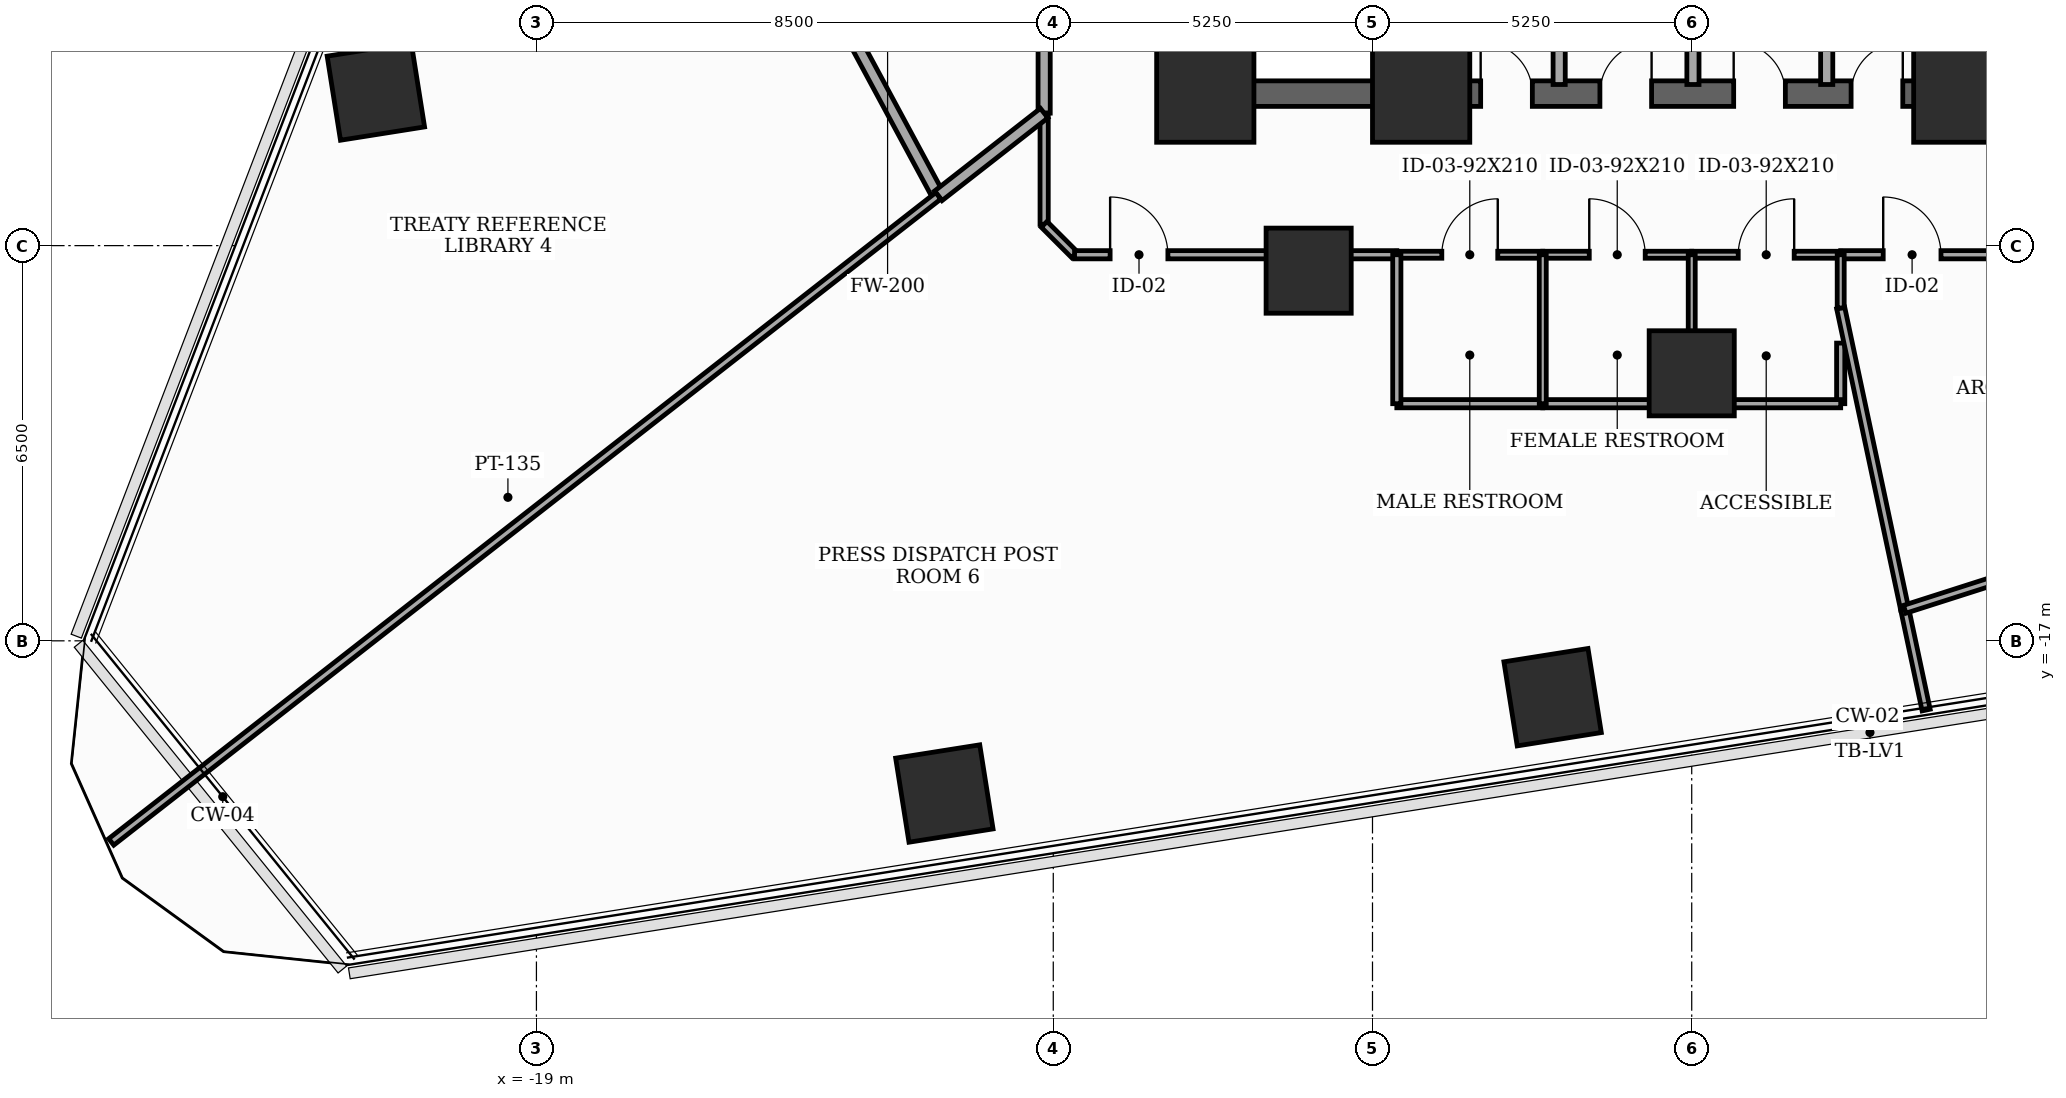
"""IFC4 building model, lengths in metres.
Left out: names, types, materials, properties, quantities, classifications, styles, units other than length and angle.
Written with IfcOpenShell. Run it as: python <this file> out.ifc"""

import sys

from ifc_helpers import new_model, si_unit, direction, frame, frame_2d, origin, origin_2d, place, context, subcontext, project, spatial, rectangle, extrude, element, fill, save


model = new_model("IFC4")
c1 = context("Model", 3, precision=1e-05, world=origin(), true_north=direction((0.0, 1.0)))
c2 = subcontext(c1, "Body", "Model", "MODEL_VIEW")
j1 = project(units=[si_unit("LENGTHUNIT", "METRE"), si_unit("PLANEANGLEUNIT", "RADIAN")], contexts=[c1])
p1 = place(None, origin())
s1 = spatial("IfcSite", under=j1, at=p1, CompositionType="ELEMENT")
p2 = place(p1, origin())
s2 = spatial("IfcBuilding", under=s1, at=p2, CompositionType="ELEMENT")
p3 = place(p2, frame((0.0, 0.0, 81.5)))
s3 = spatial("IfcBuildingStorey", under=s2, at=p3, CompositionType="ELEMENT", Elevation=81.5)
for number, where, z_axis, x_axis in (
    (1, (-8.0, -8.0, 0.0), (0.0, 0.0, 1.0), (1.0, 0.0, 0.0)),
    (2, (-4.45, -8.0, 0.0), (0.0, 0.0, 1.0), (1.0, 0.0, 0.0)),
    (3, (4.45, -8.0, 0.0), (0.0, 0.0, 1.0), (1.0, 0.0, 0.0)),
):
    element("IfcColumn", number, at=place(p3, frame(where, z_axis=z_axis, x_axis=x_axis)), inside=s3, PredefinedType="COLUMN", context=c2, shape_type="SweptSolid", body=[
        extrude(rectangle(XDim=1.6, YDim=1.6, at=origin_2d()), origin(), (0.0, 0.0, 1.0), 3.7),
    ])
for number, where, z_axis, x_axis in (
    (4, (-6.3, -10.912, 0.0), (0.0, 0.0, 1.0), (1.0, 0.0, 0.0)),
    (5, (0.0, -12.6, 0.0), (0.0, 0.0, 1.0), (1.0, 0.0, 0.0)),
    (6, (-12.291, -19.511, 0.0), (0.0, 0.0, 1.0), (0.988, 0.156, 0.0)),
    (7, (-2.288, -17.927, 0.0), (0.0, 0.0, 1.0), (0.988, 0.156, 0.0)),
    (8, (-21.641, -7.966, 0.0), (0.0, 0.0, 1.0), (0.988, 0.156, 0.0)),
):
    element("IfcColumn", number, at=place(p3, frame(where, z_axis=z_axis, x_axis=x_axis)), inside=s3, PredefinedType="COLUMN", context=c2, shape_type="SweptSolid", body=[
        extrude(rectangle(XDim=1.4, YDim=1.4, at=origin_2d()), origin(), (0.0, 0.0, 1.0), 3.7),
    ])
p4 = place(p3, frame((-8.0, -8.0, 0.0), z_axis=(0.0, 0.0, 1.0), x_axis=(0.0, 1.0, 0.0)))
e9 = element("IfcWall", 9, at=p4, inside=s3, PredefinedType="SHEAR", context=c2, shape_type="SweptSolid", body=[
    extrude(rectangle(XDim=16.0, YDim=0.42, at=frame_2d((8.0, 0.0))), origin(), (0.0, 0.0, 1.0), 3.46),
])
p5 = place(p4, frame((1.002, 0.0, 0.0)))
e10 = element("IfcOpeningElement", 10, at=p5, cuts=e9, PredefinedType="OPENING", context=c2, shape_type="SweptSolid", body=[
    extrude(rectangle(XDim=0.85, YDim=2.02, at=frame_2d((0.425, 1.01))), frame((0.0, 0.22, 0.0), z_axis=(0.0, -1.0, 0.0), x_axis=(1.0, 0.0, 0.0)), (0.0, 0.0, 1.0), 0.44),
])
p6 = place(p4, frame((5.35, 0.0, 0.0)))
e11 = element("IfcOpeningElement", 11, at=p6, cuts=e9, PredefinedType="OPENING", context=c2, shape_type="SweptSolid", body=[
    extrude(rectangle(XDim=1.05, YDim=2.15, at=frame_2d((0.525, 1.075))), frame((0.0, 0.22, 0.0), z_axis=(0.0, -1.0, 0.0), x_axis=(1.0, 0.0, 0.0)), (0.0, 0.0, 1.0), 0.44),
])
p7 = place(p3, frame((-8.0, -8.0, 0.0), z_axis=(0.0, 0.0, 1.0), x_axis=(1.0, 0.0, 0.0)))
e12 = element("IfcWall", 12, at=p7, inside=s3, PredefinedType="SHEAR", context=c2, shape_type="SweptSolid", body=[
    extrude(rectangle(XDim=16.0, YDim=0.42, at=frame_2d((8.0, 0.0))), origin(), (0.0, 0.0, 1.0), 3.46),
])
p8 = place(p7, frame((4.529, 0.0, 0.0)))
e13 = element("IfcOpeningElement", 13, at=p8, cuts=e12, PredefinedType="OPENING", context=c2, shape_type="SweptSolid", body=[
    extrude(rectangle(XDim=0.85, YDim=2.02, at=frame_2d((0.425, 1.01))), frame((0.0, 0.22, 0.0), z_axis=(0.0, -1.0, 0.0), x_axis=(1.0, 0.0, 0.0)), (0.0, 0.0, 1.0), 0.44),
])
p9 = place(p7, frame((6.49, 0.0, 0.0)))
e14 = element("IfcOpeningElement", 14, at=p9, cuts=e12, PredefinedType="OPENING", context=c2, shape_type="SweptSolid", body=[
    extrude(rectangle(XDim=0.85, YDim=2.02, at=frame_2d((0.425, 1.01))), frame((0.0, 0.22, 0.0), z_axis=(0.0, -1.0, 0.0), x_axis=(1.0, 0.0, 0.0)), (0.0, 0.0, 1.0), 0.44),
])
p10 = place(p7, frame((8.69, 0.0, 0.0)))
e15 = element("IfcOpeningElement", 15, at=p10, cuts=e12, PredefinedType="OPENING", context=c2, shape_type="SweptSolid", body=[
    extrude(rectangle(XDim=0.85, YDim=2.02, at=frame_2d((0.425, 1.01))), frame((0.0, 0.22, 0.0), z_axis=(0.0, -1.0, 0.0), x_axis=(1.0, 0.0, 0.0)), (0.0, 0.0, 1.0), 0.44),
])
p11 = place(p7, frame((10.621, 0.0, 0.0)))
e16 = element("IfcOpeningElement", 16, at=p11, cuts=e12, PredefinedType="OPENING", context=c2, shape_type="SweptSolid", body=[
    extrude(rectangle(XDim=0.85, YDim=2.02, at=frame_2d((0.425, 1.01))), frame((0.0, 0.22, 0.0), z_axis=(0.0, -1.0, 0.0), x_axis=(1.0, 0.0, 0.0)), (0.0, 0.0, 1.0), 0.44),
])
for number, where, z_axis, x_axis in (
    (17, (-4.45, -7.79, 0.0), (0.0, 0.0, 1.0), (0.0, 1.0, 0.0)),
    (18, (4.45, -7.79, 0.0), (0.0, 0.0, 1.0), (0.0, 1.0, 0.0)),
):
    element("IfcWall", number, at=place(p3, frame(where, z_axis=z_axis, x_axis=x_axis)), inside=s3, PredefinedType="SHEAR", context=c2, shape_type="SweptSolid", body=[
        extrude(rectangle(XDim=15.58, YDim=0.3, at=frame_2d((7.79, 0.0))), origin(), (0.0, 0.0, 1.0), 3.46),
    ])
p12 = place(p3, frame((4.45, -7.26, 0.0), z_axis=(0.0, 0.0, 1.0), x_axis=(1.0, 0.0, 0.0)))
e19 = element("IfcWall", 19, at=p12, inside=s3, PredefinedType="SHEAR", context=c2, shape_type="SweptSolid", body=[
    extrude(rectangle(XDim=3.55, YDim=0.3, at=frame_2d((1.775, 0.0))), origin(), (0.0, 0.0, 1.0), 3.46),
])
for number, where, z_axis, x_axis in (
    (20, (-2.18, -7.85, 0.0), (0.0, 0.0, 1.0), (0.0, 1.0, 0.0)),
    (21, (0.02, -7.85, 0.0), (0.0, 0.0, 1.0), (0.0, 1.0, 0.0)),
    (22, (2.22, -7.85, 0.0), (0.0, 0.0, 1.0), (0.0, 1.0, 0.0)),
):
    element("IfcWall", number, at=place(p3, frame(where, z_axis=z_axis, x_axis=x_axis)), inside=s3, PredefinedType="SOLIDWALL", context=c2, shape_type="SweptSolid", body=[
        extrude(rectangle(XDim=2.95, YDim=0.2, at=frame_2d((1.475, 0.0))), origin(), (0.0, 0.0, 1.0), 2.845),
    ])
p13 = place(p3, frame((-10.65, -3.992, 0.0), z_axis=(0.0, 0.0, 1.0), x_axis=(0.0, -1.0, 0.0)))
e23 = element("IfcWall", 23, at=p13, inside=s3, PredefinedType="SOLIDWALL", context=c2, shape_type="SweptSolid", body=[
    extrude(rectangle(XDim=4.329, YDim=0.2, at=frame_2d((2.165, 0.0))), origin(), (0.0, 0.0, 1.0), 2.745),
])
p14 = place(p3, frame((-10.65, -8.321, 0.0), z_axis=(0.0, 0.0, 1.0), x_axis=(0.0, -1.0, 0.0)))
e24 = element("IfcWall", 24, at=p14, inside=s3, PredefinedType="PARTITIONING", context=c2, shape_type="SweptSolid", body=[
    extrude(rectangle(XDim=1.829, YDim=0.135, at=frame_2d((0.915, 0.0))), origin(), (0.0, 0.0, 1.0), 2.045),
])
p15 = place(p3, frame((-10.65, -10.15, 0.0), z_axis=(0.0, 0.0, 1.0), x_axis=(0.707106781187, -0.707106781187, 0.0)))
e25 = element("IfcWall", 25, at=p15, inside=s3, PredefinedType="PARTITIONING", context=c2, shape_type="SweptSolid", body=[
    extrude(rectangle(XDim=0.707, YDim=0.135, at=frame_2d((0.354, 0.0))), origin(), (0.0, 0.0, 1.0), 3.46),
])
p16 = place(p3, frame((-10.15, -10.65, 0.0), z_axis=(0.0, 0.0, 1.0), x_axis=(1.0, 0.0, 0.0)))
e26 = element("IfcWall", 26, at=p16, inside=s3, PredefinedType="PARTITIONING", context=c2, shape_type="SweptSolid", body=[
    extrude(rectangle(XDim=5.3, YDim=0.135, at=frame_2d((2.65, 0.0))), origin(), (0.0, 0.0, 1.0), 2.045),
])
p17 = place(p16, frame((0.585, 0.0, 0.0)))
e27 = element("IfcOpeningElement", 27, at=p17, cuts=e26, PredefinedType="OPENING", context=c2, shape_type="SweptSolid", body=[
    extrude(rectangle(XDim=0.95, YDim=2.0, at=frame_2d((0.475, 1.0))), frame((0.0, 0.077, 0.0), z_axis=(0.0, -1.0, 0.0), x_axis=(1.0, 0.0, 0.0)), (0.0, 0.0, 1.0), 0.155),
])
p18 = place(p3, frame((-4.85, -10.65, 0.0), z_axis=(0.0, 0.0, 1.0), x_axis=(1.0, 0.0, 0.0)))
e28 = element("IfcWall", 28, at=p18, inside=s3, PredefinedType="PARTITIONING", context=c2, shape_type="SweptSolid", body=[
    extrude(rectangle(XDim=2.4, YDim=0.115, at=frame_2d((1.2, 0.0))), origin(), (0.0, 0.0, 1.0), 3.46),
])
p19 = place(p18, frame((0.74, 0.0, 0.0)))
e29 = element("IfcOpeningElement", 29, at=p19, cuts=e28, PredefinedType="OPENING", context=c2, shape_type="SweptSolid", body=[
    extrude(rectangle(XDim=0.92, YDim=2.1, at=frame_2d((0.46, 1.05))), frame((0.0, 0.067, 0.0), z_axis=(0.0, -1.0, 0.0), x_axis=(1.0, 0.0, 0.0)), (0.0, 0.0, 1.0), 0.135),
])
p20 = place(p3, frame((-2.45, -10.65, 0.0), z_axis=(0.0, 0.0, 1.0), x_axis=(1.0, 0.0, 0.0)))
e30 = element("IfcWall", 30, at=p20, inside=s3, PredefinedType="PARTITIONING", context=c2, shape_type="SweptSolid", body=[
    extrude(rectangle(XDim=2.45, YDim=0.115, at=frame_2d((1.225, 0.0))), origin(), (0.0, 0.0, 1.0), 2.745),
])
p21 = place(p20, frame((0.765, 0.0, 0.0)))
e31 = element("IfcOpeningElement", 31, at=p21, cuts=e30, PredefinedType="OPENING", context=c2, shape_type="SweptSolid", body=[
    extrude(rectangle(XDim=0.92, YDim=2.1, at=frame_2d((0.46, 1.05))), frame((0.0, 0.067, 0.0), z_axis=(0.0, -1.0, 0.0), x_axis=(1.0, 0.0, 0.0)), (0.0, 0.0, 1.0), 0.135),
])
p22 = place(p3, frame((0.0, -10.65, 0.0), z_axis=(0.0, 0.0, 1.0), x_axis=(1.0, 0.0, 0.0)))
e32 = element("IfcWall", 32, at=p22, inside=s3, PredefinedType="PARTITIONING", context=c2, shape_type="SweptSolid", body=[
    extrude(rectangle(XDim=2.45, YDim=0.115, at=frame_2d((1.225, 0.0))), origin(), (0.0, 0.0, 1.0), 3.46),
])
p23 = place(p22, frame((0.765, 0.0, 0.0)))
e33 = element("IfcOpeningElement", 33, at=p23, cuts=e32, PredefinedType="OPENING", context=c2, shape_type="SweptSolid", body=[
    extrude(rectangle(XDim=0.92, YDim=2.1, at=frame_2d((0.46, 1.05))), frame((0.0, 0.067, 0.0), z_axis=(0.0, -1.0, 0.0), x_axis=(1.0, 0.0, 0.0)), (0.0, 0.0, 1.0), 0.135),
])
p24 = place(p3, frame((2.45, -10.65, 0.0), z_axis=(0.0, 0.0, 1.0), x_axis=(1.0, 0.0, 0.0)))
e34 = element("IfcWall", 34, at=p24, inside=s3, PredefinedType="PARTITIONING", context=c2, shape_type="SweptSolid", body=[
    extrude(rectangle(XDim=5.871, YDim=0.135, at=frame_2d((2.936, 0.0))), origin(), (0.0, 0.0, 1.0), 2.045),
])
p25 = place(p24, frame((0.699, 0.0, 0.0)))
e35 = element("IfcOpeningElement", 35, at=p25, cuts=e34, PredefinedType="OPENING", context=c2, shape_type="SweptSolid", body=[
    extrude(rectangle(XDim=0.95, YDim=2.0, at=frame_2d((0.475, 1.0))), frame((0.0, 0.077, 0.0), z_axis=(0.0, -1.0, 0.0), x_axis=(1.0, 0.0, 0.0)), (0.0, 0.0, 1.0), 0.155),
])
p26 = place(p3, frame((-14.851, -5.118, 0.0), z_axis=(0.0, 0.0, 1.0), x_axis=(0.474543506137, -0.880232049395, 0.0)))
e36 = element("IfcWall", 36, at=p26, inside=s3, PredefinedType="SOLIDWALL", context=c2, shape_type="SweptSolid", body=[
    extrude(rectangle(XDim=5.184, YDim=0.2, at=frame_2d((2.592, 0.0))), origin(), (0.0, 0.0, 1.0), 2.045),
])
p27 = place(p3, frame((-12.391, -9.681, 0.0), z_axis=(0.0, 0.0, 1.0), x_axis=(0.788124883644, 0.615515367624, 0.0)))
e37 = element("IfcWall", 37, at=p27, inside=s3, PredefinedType="SOLIDWALL", context=c2, shape_type="SweptSolid", body=[
    extrude(rectangle(XDim=2.209, YDim=0.2, at=frame_2d((1.104, 0.0))), origin(), (0.0, 0.0, 1.0), 2.045),
])
p28 = place(p3, frame((-25.993, -20.307, 0.0), z_axis=(0.0, 0.0, 1.0), x_axis=(0.788017511585, 0.61565282541, 0.0)))
e38 = element("IfcWall", 38, at=p28, inside=s3, PredefinedType="PARTITIONING", context=c2, shape_type="SweptSolid", body=[
    extrude(rectangle(XDim=17.26, YDim=0.135, at=frame_2d((8.63, 0.0))), origin(), (0.0, 0.0, 1.0), 2.045),
])
p29 = place(p3, frame((-2.45, -13.1, 0.0), z_axis=(0.0, 0.0, 1.0), x_axis=(-1.0, 0.0, 0.0)))
e39 = element("IfcWall", 39, at=p29, inside=s3, PredefinedType="PARTITIONING", context=c2, shape_type="SweptSolid", body=[
    extrude(rectangle(XDim=2.4, YDim=0.135, at=frame_2d((1.2, 0.0))), origin(), (0.0, 0.0, 1.0), 3.46),
])
p30 = place(p3, frame((-4.85, -13.1, 0.0), z_axis=(0.0, 0.0, 1.0), x_axis=(0.0, 1.0, 0.0)))
e40 = element("IfcWall", 40, at=p30, inside=s3, PredefinedType="PARTITIONING", context=c2, shape_type="SweptSolid", body=[
    extrude(rectangle(XDim=2.45, YDim=0.135, at=frame_2d((1.225, 0.0))), origin(), (0.0, 0.0, 1.0), 2.745),
])
p31 = place(p3, frame((0.0, -13.1, 0.0), z_axis=(0.0, 0.0, 1.0), x_axis=(-1.0, 0.0, 0.0)))
e41 = element("IfcWall", 41, at=p31, inside=s3, PredefinedType="PARTITIONING", context=c2, shape_type="SweptSolid", body=[
    extrude(rectangle(XDim=2.45, YDim=0.135, at=frame_2d((1.225, 0.0))), origin(), (0.0, 0.0, 1.0), 2.045),
])
p32 = place(p3, frame((2.45, -12.103, 0.0), z_axis=(0.0, 0.0, 1.0), x_axis=(0.0, -1.0, 0.0)))
e42 = element("IfcWall", 42, at=p32, inside=s3, PredefinedType="PARTITIONING", context=c2, shape_type="SweptSolid", body=[
    extrude(rectangle(XDim=0.997, YDim=0.135, at=frame_2d((0.499, 0.0))), origin(), (0.0, 0.0, 1.0), 2.745),
])
p33 = place(p3, frame((2.45, -13.1, 0.0), z_axis=(0.0, 0.0, 1.0), x_axis=(-1.0, 0.0, 0.0)))
e43 = element("IfcWall", 43, at=p33, inside=s3, PredefinedType="PARTITIONING", context=c2, shape_type="SweptSolid", body=[
    extrude(rectangle(XDim=2.45, YDim=0.135, at=frame_2d((1.225, 0.0))), origin(), (0.0, 0.0, 1.0), 2.045),
])
p34 = place(p3, frame((3.503, -16.481, 0.0), z_axis=(0.0, 0.0, 1.0), x_axis=(-0.207863367053, 0.97815787102, 0.0)))
e44 = element("IfcWall", 44, at=p34, inside=s3, PredefinedType="PARTITIONING", context=c2, shape_type="SweptSolid", body=[
    extrude(rectangle(XDim=5.066, YDim=0.135, at=frame_2d((2.533, 0.0))), origin(), (0.0, 0.0, 1.0), 2.045),
])
p35 = place(p3, frame((3.855, -18.139, 0.0), z_axis=(0.0, 0.0, 1.0), x_axis=(-0.207875985054, 0.978155189547, 0.0)))
e45 = element("IfcWall", 45, at=p35, inside=s3, PredefinedType="PARTITIONING", context=c2, shape_type="SweptSolid", body=[
    extrude(rectangle(XDim=1.695, YDim=0.135, at=frame_2d((0.847, 0.0))), origin(), (0.0, 0.0, 1.0), 2.045),
])
p36 = place(p3, frame((-2.45, -13.1, 0.0), z_axis=(0.0, 0.0, 1.0), x_axis=(0.0, 1.0, 0.0)))
e46 = element("IfcWall", 46, at=p36, inside=s3, PredefinedType="PARTITIONING", context=c2, shape_type="SweptSolid", body=[
    extrude(rectangle(XDim=2.45, YDim=0.115, at=frame_2d((1.225, 0.0))), origin(), (0.0, 0.0, 1.0), 2.745),
])
p37 = place(p3, frame((0.0, -13.1, 0.0), z_axis=(0.0, 0.0, 1.0), x_axis=(0.0, 1.0, 0.0)))
e47 = element("IfcWall", 47, at=p37, inside=s3, PredefinedType="PARTITIONING", context=c2, shape_type="SweptSolid", body=[
    extrude(rectangle(XDim=2.45, YDim=0.115, at=frame_2d((1.225, 0.0))), origin(), (0.0, 0.0, 1.0), 2.045),
])
p38 = place(p3, frame((2.45, -11.526, 0.0), z_axis=(0.0, 0.0, 1.0), x_axis=(0.0, 1.0, 0.0)))
e48 = element("IfcWall", 48, at=p38, inside=s3, PredefinedType="PARTITIONING", context=c2, shape_type="SweptSolid", body=[
    extrude(rectangle(XDim=0.876, YDim=0.115, at=frame_2d((0.438, 0.0))), origin(), (0.0, 0.0, 1.0), 3.46),
])
p39 = place(p3, frame((3.503, -16.481, 0.0), z_axis=(0.0, 0.0, 1.0), x_axis=(0.952459752792, 0.304664437227, 0.0)))
e49 = element("IfcWall", 49, at=p39, inside=s3, PredefinedType="PARTITIONING", context=c2, shape_type="SweptSolid", body=[
    extrude(rectangle(XDim=3.821, YDim=0.135, at=frame_2d((1.91, 0.0))), origin(), (0.0, 0.0, 1.0), 2.045),
])
p40 = place(p8, origin())
e50 = element("IfcDoor", 50, at=p40, inside=s3, OperationType="SINGLE_SWING_LEFT", PredefinedType="TRAPDOOR", context=c2, shape_type="SweptSolid", body=[
    extrude(rectangle(XDim=0.85, YDim=2.02, at=frame_2d((0.425, 1.01))), frame((0.0, 0.025, 0.0), z_axis=(0.0, -1.0, 0.0), x_axis=(1.0, 0.0, 0.0)), (0.0, 0.0, 1.0), 0.05),
])
fill(e13, e50)
p41 = place(p9, origin())
e51 = element("IfcDoor", 51, at=p41, inside=s3, OperationType="SINGLE_SWING_RIGHT", PredefinedType="TRAPDOOR", context=c2, shape_type="SweptSolid", body=[
    extrude(rectangle(XDim=0.85, YDim=2.02, at=frame_2d((0.425, 1.01))), frame((0.0, 0.025, 0.0), z_axis=(0.0, -1.0, 0.0), x_axis=(1.0, 0.0, 0.0)), (0.0, 0.0, 1.0), 0.05),
])
fill(e14, e51)
p42 = place(p10, origin())
e52 = element("IfcDoor", 52, at=p42, inside=s3, OperationType="SINGLE_SWING_LEFT", PredefinedType="TRAPDOOR", context=c2, shape_type="SweptSolid", body=[
    extrude(rectangle(XDim=0.85, YDim=2.02, at=frame_2d((0.425, 1.01))), frame((0.0, 0.025, 0.0), z_axis=(0.0, -1.0, 0.0), x_axis=(1.0, 0.0, 0.0)), (0.0, 0.0, 1.0), 0.05),
])
fill(e15, e52)
p43 = place(p11, origin())
e53 = element("IfcDoor", 53, at=p43, inside=s3, OperationType="SINGLE_SWING_RIGHT", PredefinedType="TRAPDOOR", context=c2, shape_type="SweptSolid", body=[
    extrude(rectangle(XDim=0.85, YDim=2.02, at=frame_2d((0.425, 1.01))), frame((0.0, 0.025, 0.0), z_axis=(0.0, -1.0, 0.0), x_axis=(1.0, 0.0, 0.0)), (0.0, 0.0, 1.0), 0.05),
])
fill(e16, e53)
p44 = place(p17, origin())
e54 = element("IfcDoor", 54, at=p44, inside=s3, OperationType="SINGLE_SWING_LEFT", PredefinedType="DOOR", context=c2, shape_type="SweptSolid", body=[
    extrude(rectangle(XDim=0.95, YDim=2.0, at=frame_2d((0.475, 1.0))), frame((0.0, 0.025, 0.0), z_axis=(0.0, -1.0, 0.0), x_axis=(1.0, 0.0, 0.0)), (0.0, 0.0, 1.0), 0.05),
])
fill(e27, e54)
p45 = place(p19, origin())
e55 = element("IfcDoor", 55, at=p45, inside=s3, OperationType="SINGLE_SWING_RIGHT", PredefinedType="DOOR", context=c2, shape_type="SweptSolid", body=[
    extrude(rectangle(XDim=0.92, YDim=2.1, at=frame_2d((0.46, 1.05))), frame((0.0, 0.025, 0.0), z_axis=(0.0, -1.0, 0.0), x_axis=(1.0, 0.0, 0.0)), (0.0, 0.0, 1.0), 0.05),
])
fill(e29, e55)
p46 = place(p21, origin())
e56 = element("IfcDoor", 56, at=p46, inside=s3, OperationType="SINGLE_SWING_LEFT", PredefinedType="DOOR", context=c2, shape_type="SweptSolid", body=[
    extrude(rectangle(XDim=0.92, YDim=2.1, at=frame_2d((0.46, 1.05))), frame((0.0, 0.025, 0.0), z_axis=(0.0, -1.0, 0.0), x_axis=(1.0, 0.0, 0.0)), (0.0, 0.0, 1.0), 0.05),
])
fill(e31, e56)
p47 = place(p23, origin())
e57 = element("IfcDoor", 57, at=p47, inside=s3, OperationType="SINGLE_SWING_RIGHT", PredefinedType="DOOR", context=c2, shape_type="SweptSolid", body=[
    extrude(rectangle(XDim=0.92, YDim=2.1, at=frame_2d((0.46, 1.05))), frame((0.0, 0.025, 0.0), z_axis=(0.0, -1.0, 0.0), x_axis=(1.0, 0.0, 0.0)), (0.0, 0.0, 1.0), 0.05),
])
fill(e33, e57)
p48 = place(p25, origin())
e58 = element("IfcDoor", 58, at=p48, inside=s3, OperationType="SINGLE_SWING_LEFT", PredefinedType="DOOR", context=c2, shape_type="SweptSolid", body=[
    extrude(rectangle(XDim=0.95, YDim=2.0, at=frame_2d((0.475, 1.0))), frame((0.0, 0.025, 0.0), z_axis=(0.0, -1.0, 0.0), x_axis=(1.0, 0.0, 0.0)), (0.0, 0.0, 1.0), 0.05),
])
fill(e35, e58)
save(model, sys.argv[1])
